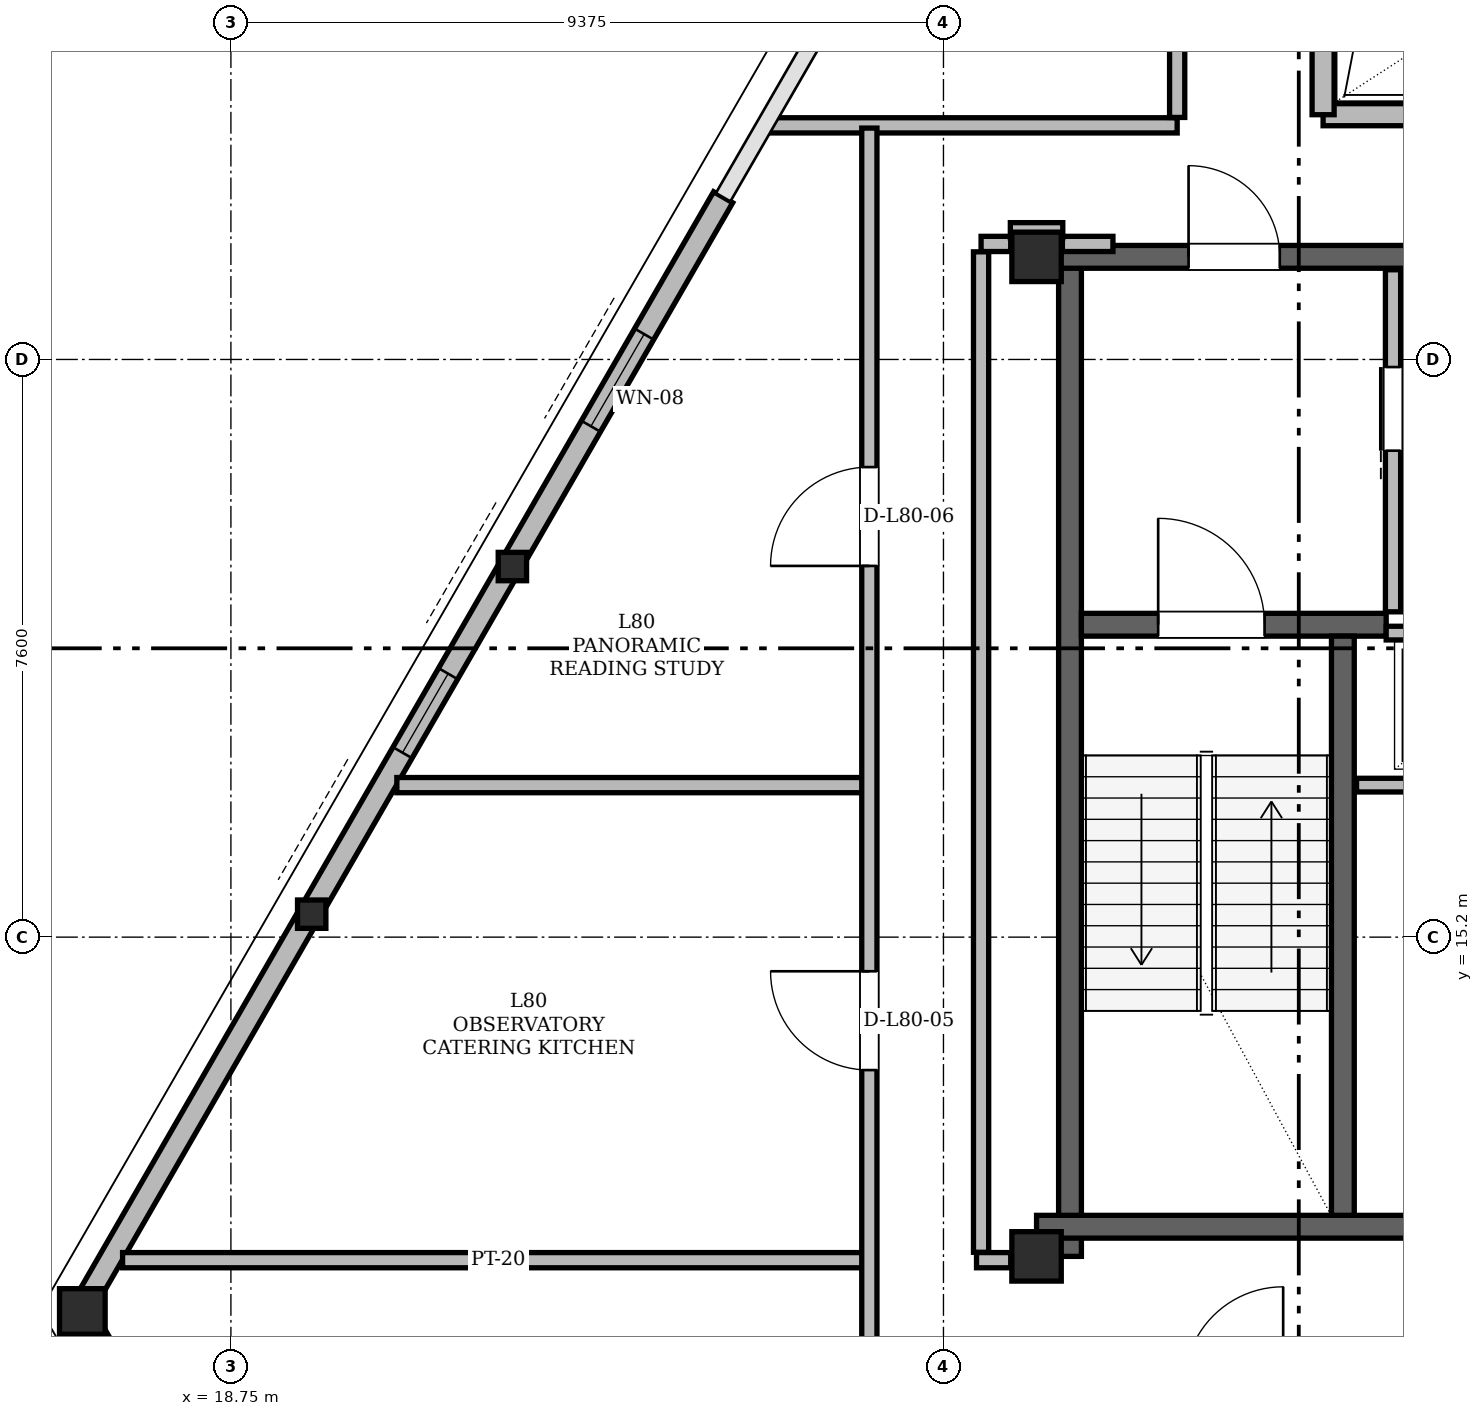
"""IFC4 building model, lengths in metres.
Left out: names, types, materials, properties, quantities, classifications, styles, units other than length and angle.
Written with IfcOpenShell. Run it as: python <this file> out.ifc"""

import sys

from ifc_helpers import new_model, si_unit, direction, frame, frame_2d, origin, origin_2d, place, context, subcontext, project, spatial, rectangle, hollow_rectangle, i_section, extrude, element, fill, save


model = new_model("IFC4")
c1 = context("Model", 3, precision=1e-05, world=origin(), true_north=direction((0.0, 1.0)))
c2 = subcontext(c1, "Body", "Model", "MODEL_VIEW")
j1 = project(units=[si_unit("LENGTHUNIT", "METRE"), si_unit("PLANEANGLEUNIT", "RADIAN")], contexts=[c1])
p1 = place(None, origin())
s1 = spatial("IfcSite", under=j1, at=p1, CompositionType="ELEMENT")
p2 = place(p1, origin())
s2 = spatial("IfcBuilding", under=s1, at=p2, CompositionType="ELEMENT")
p3 = place(p2, frame((0.0, 0.0, 305.1)))
s3 = spatial("IfcBuildingStorey", under=s2, at=p3, CompositionType="ELEMENT", Elevation=305.1)
for number, where, z_axis, x_axis in (
    (1, (29.35, 11.0, 0.0), (0.0, 0.0, 1.0), (1.0, 0.0, 0.0)),
    (2, (29.35, 24.15, 0.0), (0.0, 0.0, 1.0), (1.0, 0.0, 0.0)),
):
    element("IfcColumn", number, at=place(p3, frame(where, z_axis=z_axis, x_axis=x_axis)), inside=s3, PredefinedType="COLUMN", context=c2, shape_type="SweptSolid", body=[
        extrude(hollow_rectangle(XDim=0.65, YDim=0.65, WallThickness=0.05, at=origin_2d()), origin(), (0.0, 0.0, 1.0), 4.5),
    ])
p4 = place(p3, frame((16.776, 10.298, 0.004), z_axis=(0.008371104998, -0.010273628862, 0.99991218472), x_axis=(0.775234985517, 0.631672951162, 0.0)))
e3 = element("IfcColumn", 3, at=p4, inside=s3, PredefinedType="COLUMN", context=c2, shape_type="SweptSolid", body=[
    extrude(hollow_rectangle(XDim=0.6, YDim=0.6, WallThickness=0.045, at=origin_2d()), origin(), (0.0, 0.0, 1.0), 4.491),
])
p5 = place(p3, frame((22.431, 20.093, 0.004), z_axis=(0.009784499524, -0.007827599619, 0.999921493045), x_axis=(0.624695047554, 0.780868809443, 0.0)))
e4 = element("IfcColumn", 4, at=p5, inside=s3, PredefinedType="COLUMN", context=c2, shape_type="SweptSolid", body=[
    extrude(i_section(OverallWidth=0.373, OverallDepth=0.373, WebThickness=0.016, FlangeThickness=0.026, at=origin_2d()), origin(), (0.0, 0.0, 1.0), 4.491),
])
p6 = place(p3, frame((19.792, 15.522, 0.004), z_axis=(0.009132168349, -0.008969093914, 0.999918076072), x_axis=(0.700708014884, 0.713448160609, 0.0)))
e5 = element("IfcColumn", 5, at=p6, inside=s3, PredefinedType="COLUMN", context=c2, shape_type="SweptSolid", body=[
    extrude(i_section(OverallWidth=0.373, OverallDepth=0.373, WebThickness=0.016, FlangeThickness=0.026, at=origin_2d()), origin(), (0.0, 0.0, 1.0), 4.491),
])
p7 = place(p3, frame((29.79, 11.0, 0.0), z_axis=(0.0, 0.0, 1.0), x_axis=(0.0, 1.0, 0.0)))
e6 = element("IfcWall", 6, at=p7, inside=s3, PredefinedType="SHEAR", context=c2, shape_type="SweptSolid", body=[
    extrude(rectangle(XDim=13.3, YDim=0.3, at=frame_2d((6.65, 0.0))), origin(), (0.0, 0.0, 1.0), 4.28),
])
p8 = place(p3, frame((29.35, 11.39, 0.0), z_axis=(0.0, 0.0, 1.0), x_axis=(1.0, 0.0, 0.0)))
e7 = element("IfcWall", 7, at=p8, inside=s3, PredefinedType="SHEAR", context=c2, shape_type="SweptSolid", body=[
    extrude(rectangle(XDim=7.1, YDim=0.3, at=frame_2d((3.55, 0.0))), origin(), (0.0, 0.0, 1.0), 4.28),
])
p9 = place(p3, frame((29.65, 24.15, 0.0), z_axis=(0.0, 0.0, 1.0), x_axis=(1.0, 0.0, 0.0)))
e8 = element("IfcWall", 8, at=p9, inside=s3, PredefinedType="SHEAR", context=c2, shape_type="SweptSolid", body=[
    extrude(rectangle(XDim=15.7, YDim=0.3, at=frame_2d((7.85, 0.0))), origin(), (0.0, 0.0, 1.0), 4.28),
])
p10 = place(p9, frame((1.7, 0.0, 0.0)))
e9 = element("IfcOpeningElement", 9, at=p10, cuts=e8, PredefinedType="OPENING", context=c2, shape_type="SweptSolid", body=[
    extrude(rectangle(XDim=1.2, YDim=2.2, at=frame_2d((0.6, 1.1))), frame((0.0, 0.15, 0.0), z_axis=(0.0, -1.0, 0.0), x_axis=(1.0, 0.0, 0.0)), (0.0, 0.0, 1.0), 0.3),
])
p11 = place(p9, frame((12.8, 0.0, 0.0)))
e10 = element("IfcOpeningElement", 10, at=p11, cuts=e8, PredefinedType="OPENING", context=c2, shape_type="SweptSolid", body=[
    extrude(rectangle(XDim=1.2, YDim=2.2, at=frame_2d((0.6, 1.1))), frame((0.0, 0.15, 0.0), z_axis=(0.0, -1.0, 0.0), x_axis=(1.0, 0.0, 0.0)), (0.0, 0.0, 1.0), 0.3),
])
p12 = place(p9, frame((6.55, 0.0, 0.0)))
e11 = element("IfcOpeningElement", 11, at=p12, cuts=e8, PredefinedType="OPENING", context=c2, shape_type="SweptSolid", body=[
    extrude(rectangle(XDim=0.9, YDim=2.05, at=frame_2d((0.45, 1.025))), frame((0.0, 0.15, 0.0), z_axis=(0.0, -1.0, 0.0), x_axis=(1.0, 0.0, 0.0)), (0.0, 0.0, 1.0), 0.3),
])
p13 = place(p9, frame((8.45, 0.0, 0.0)))
e12 = element("IfcOpeningElement", 12, at=p13, cuts=e8, PredefinedType="OPENING", context=c2, shape_type="SweptSolid", body=[
    extrude(rectangle(XDim=0.9, YDim=2.05, at=frame_2d((0.45, 1.025))), frame((0.0, 0.15, 0.0), z_axis=(0.0, -1.0, 0.0), x_axis=(1.0, 0.0, 0.0)), (0.0, 0.0, 1.0), 0.3),
])
p14 = place(p3, frame((29.94, 19.31, 0.0), z_axis=(0.0, 0.0, 1.0), x_axis=(1.0, 0.0, 0.0)))
e13 = element("IfcWall", 13, at=p14, inside=s3, PredefinedType="SHEAR", context=c2, shape_type="SweptSolid", body=[
    extrude(rectangle(XDim=4.01, YDim=0.3, at=frame_2d((2.005, 0.0))), origin(), (0.0, 0.0, 1.0), 4.28),
])
p15 = place(p14, frame((1.01, 0.0, 0.0)))
e14 = element("IfcOpeningElement", 14, at=p15, cuts=e13, PredefinedType="OPENING", context=c2, shape_type="SweptSolid", body=[
    extrude(rectangle(XDim=1.4, YDim=2.2, at=frame_2d((0.7, 1.1))), frame((0.0, 0.15, 0.0), z_axis=(0.0, -1.0, 0.0), x_axis=(1.0, 0.0, 0.0)), (0.0, 0.0, 1.0), 0.3),
])
p16 = place(p3, frame((33.38, 11.54, 0.0), z_axis=(0.0, 0.0, 1.0), x_axis=(0.0, 1.0, 0.0)))
e15 = element("IfcWall", 15, at=p16, inside=s3, PredefinedType="SHEAR", context=c2, shape_type="SweptSolid", body=[
    extrude(rectangle(XDim=7.62, YDim=0.3, at=frame_2d((3.81, 0.0))), origin(), (0.0, 0.0, 1.0), 4.28),
])
p17 = place(p3, frame((16.776, 10.298, 0.0), z_axis=(0.0, 0.0, 1.0), x_axis=(0.500000729302, -0.866024982721, 0.0)))
e16 = element("IfcWall", 16, at=p17, inside=s3, PredefinedType="SOLIDWALL", context=c2, shape_type="SweptSolid", body=[
    extrude(rectangle(XDim=3.747, YDim=0.29, at=frame_2d((1.873, 0.0))), origin(), (0.0, 0.0, 1.0), 3.658),
])
p18 = place(p3, frame((25.227, 24.934, 0.0), z_axis=(0.0, 0.0, 1.0), x_axis=(-0.500004644874, -0.866022722049, 0.0)))
e17 = element("IfcWall", 17, at=p18, inside=s3, PredefinedType="SOLIDWALL", context=c2, shape_type="SweptSolid", body=[
    extrude(rectangle(XDim=16.9, YDim=0.29, at=frame_2d((8.45, 0.0))), origin(), (0.0, 0.0, 1.0), 3.658),
])
p19 = place(p18, frame((2.079, 0.0, 0.85)))
e18 = element("IfcOpeningElement", 18, at=p19, cuts=e17, PredefinedType="OPENING", context=c2, shape_type="SweptSolid", body=[
    extrude(rectangle(XDim=1.4, YDim=1.6, at=frame_2d((0.7, 0.8))), frame((0.0, 0.145, 0.0), z_axis=(0.0, -1.0, 0.0), x_axis=(1.0, 0.0, 0.0)), (0.0, 0.0, 1.0), 0.29),
])
p20 = place(p18, frame((7.238, 0.0, 0.85)))
e19 = element("IfcOpeningElement", 19, at=p20, cuts=e17, PredefinedType="OPENING", context=c2, shape_type="SweptSolid", body=[
    extrude(rectangle(XDim=1.2, YDim=1.48, at=frame_2d((0.6, 0.74))), frame((0.0, 0.145, 0.0), z_axis=(0.0, -1.0, 0.0), x_axis=(1.0, 0.0, 0.0)), (0.0, 0.0, 1.0), 0.29),
])
p21 = place(p3, frame((33.12, 26.02, 0.0), z_axis=(0.0, 0.0, 1.0), x_axis=(1.0, 0.0, 0.0)))
e20 = element("IfcWall", 20, at=p21, inside=s3, PredefinedType="SOLIDWALL", context=c2, shape_type="SweptSolid", body=[
    extrude(rectangle(XDim=10.56, YDim=0.29, at=frame_2d((5.28, 0.0))), origin(), (0.0, 0.0, 1.0), 4.28),
])
p22 = place(p21, frame((1.68, 0.0, 0.0)))
e21 = element("IfcOpeningElement", 21, at=p22, cuts=e20, PredefinedType="OPENING", context=c2, shape_type="SweptSolid", body=[
    extrude(rectangle(XDim=1.6, YDim=2.2, at=frame_2d((0.8, 1.1))), frame((0.0, 0.145, 0.0), z_axis=(0.0, -1.0, 0.0), x_axis=(1.0, 0.0, 0.0)), (0.0, 0.0, 1.0), 0.29),
])
p23 = place(p21, frame((7.28, 0.0, 0.0)))
e22 = element("IfcOpeningElement", 22, at=p23, cuts=e20, PredefinedType="OPENING", context=c2, shape_type="SweptSolid", body=[
    extrude(rectangle(XDim=1.6, YDim=2.2, at=frame_2d((0.8, 1.1))), frame((0.0, 0.145, 0.0), z_axis=(0.0, -1.0, 0.0), x_axis=(1.0, 0.0, 0.0)), (0.0, 0.0, 1.0), 0.29),
])
p24 = place(p3, frame((33.12, 26.02, 0.0), z_axis=(0.0, 0.0, 1.0), x_axis=(0.0, 1.0, 0.0)))
e23 = element("IfcWall", 23, at=p24, inside=s3, PredefinedType="SOLIDWALL", context=c2, shape_type="SweptSolid", body=[
    extrude(rectangle(XDim=6.96, YDim=0.29, at=frame_2d((3.48, 0.0))), origin(), (0.0, 0.0, 1.0), 4.28),
])
p25 = place(p3, frame((34.04, 19.48, 0.0), z_axis=(0.0, 0.0, 1.0), x_axis=(0.0, 1.0, 0.0)))
e24 = element("IfcWall", 24, at=p25, inside=s3, PredefinedType="PARTITIONING", context=c2, shape_type="SweptSolid", body=[
    extrude(rectangle(XDim=4.5, YDim=0.2, at=frame_2d((2.25, 0.0))), origin(), (0.0, 0.0, 1.0), 4.28),
])
p26 = place(p25, frame((2.12, 0.0, 0.0)))
e25 = element("IfcOpeningElement", 25, at=p26, cuts=e24, PredefinedType="OPENING", context=c2, shape_type="SweptSolid", body=[
    extrude(rectangle(XDim=1.1, YDim=2.2, at=frame_2d((0.55, 1.1))), frame((0.0, 0.1, 0.0), z_axis=(0.0, -1.0, 0.0), x_axis=(1.0, 0.0, 0.0)), (0.0, 0.0, 1.0), 0.2),
])
p27 = place(p3, frame((34.16, 20.86, 0.0), z_axis=(0.0, 0.0, 1.0), x_axis=(1.0, 0.0, 0.0)))
e26 = element("IfcWall", 26, at=p27, inside=s3, PredefinedType="PARTITIONING", context=c2, shape_type="SweptSolid", body=[
    extrude(rectangle(XDim=1.58, YDim=0.18, at=frame_2d((0.79, 0.0))), origin(), (0.0, 0.0, 1.0), 4.28),
])
p28 = place(p3, frame((33.95, 19.2, 0.0), z_axis=(0.0, 0.0, 1.0), x_axis=(1.0, 0.0, 0.0)))
e27 = element("IfcWall", 27, at=p28, inside=s3, PredefinedType="PARTITIONING", context=c2, shape_type="SweptSolid", body=[
    extrude(rectangle(XDim=2.27, YDim=0.18, at=frame_2d((1.135, 0.0))), origin(), (0.0, 0.0, 1.0), 4.28),
])
p29 = place(p3, frame((33.56, 17.2, 0.0), z_axis=(0.0, 0.0, 1.0), x_axis=(1.0, 0.0, 0.0)))
e28 = element("IfcWall", 28, at=p29, inside=s3, PredefinedType="PARTITIONING", context=c2, shape_type="SweptSolid", body=[
    extrude(rectangle(XDim=2.66, YDim=0.18, at=frame_2d((1.33, 0.0))), origin(), (0.0, 0.0, 1.0), 4.28),
])
p30 = place(p3, frame((17.325, 10.95, 0.0), z_axis=(0.0, 0.0, 1.0), x_axis=(1.0, 0.0, 0.0)))
e29 = element("IfcWall", 29, at=p30, inside=s3, PredefinedType="PARTITIONING", context=c2, shape_type="SweptSolid", body=[
    extrude(rectangle(XDim=9.885, YDim=0.2, at=frame_2d((4.943, 0.0))), origin(), (0.0, 0.0, 1.0), 3.866),
])
p31 = place(p3, frame((28.56, 10.95, 0.0), z_axis=(0.0, 0.0, 1.0), x_axis=(1.0, 0.0, 0.0)))
e30 = element("IfcWall", 30, at=p31, inside=s3, PredefinedType="PARTITIONING", context=c2, shape_type="SweptSolid", body=[
    extrude(rectangle(XDim=0.45, YDim=0.2, at=frame_2d((0.225, 0.0))), origin(), (0.0, 0.0, 1.0), 3.866),
])
p32 = place(p3, frame((20.933, 17.2, 0.0), z_axis=(0.0, 0.0, 1.0), x_axis=(1.0, 0.0, 0.0)))
e31 = element("IfcWall", 31, at=p32, inside=s3, PredefinedType="PARTITIONING", context=c2, shape_type="SweptSolid", body=[
    extrude(rectangle(XDim=6.217, YDim=0.2, at=frame_2d((3.108, 0.0))), origin(), (0.0, 0.0, 1.0), 4.28),
])
p33 = place(p3, frame((28.62, 24.32, 0.0), z_axis=(0.0, 0.0, 1.0), x_axis=(1.0, 0.0, 0.0)))
e32 = element("IfcWall", 32, at=p33, inside=s3, PredefinedType="PARTITIONING", context=c2, shape_type="SweptSolid", body=[
    extrude(rectangle(XDim=0.39, YDim=0.2, at=frame_2d((0.195, 0.0))), origin(), (0.0, 0.0, 1.0), 4.28),
])
p34 = place(p3, frame((29.69, 24.32, 0.0), z_axis=(0.0, 0.0, 1.0), x_axis=(1.0, 0.0, 0.0)))
e33 = element("IfcWall", 33, at=p34, inside=s3, PredefinedType="PARTITIONING", context=c2, shape_type="SweptSolid", body=[
    extrude(rectangle(XDim=0.665, YDim=0.2, at=frame_2d((0.333, 0.0))), origin(), (0.0, 0.0, 1.0), 3.42),
])
p35 = place(p3, frame((29.005, 24.5, 0.0), z_axis=(0.0, 0.0, 1.0), x_axis=(1.0, 0.0, 0.0)))
e34 = element("IfcWall", 34, at=p35, inside=s3, PredefinedType="PARTITIONING", context=c2, shape_type="SweptSolid", body=[
    extrude(rectangle(XDim=0.69, YDim=0.2, at=frame_2d((0.345, 0.0))), origin(), (0.0, 0.0, 1.0), 4.28),
])
p36 = place(p3, frame((25.836, 25.88, 0.0), z_axis=(0.0, 0.0, 1.0), x_axis=(1.0, 0.0, 0.0)))
e35 = element("IfcWall", 35, at=p36, inside=s3, PredefinedType="PARTITIONING", context=c2, shape_type="SweptSolid", body=[
    extrude(rectangle(XDim=5.364, YDim=0.2, at=frame_2d((2.682, 0.0))), origin(), (0.0, 0.0, 1.0), 3.658),
])
p37 = place(p3, frame((27.15, 9.404, 0.0), z_axis=(0.0, 0.0, 1.0), x_axis=(0.0, 1.0, 0.0)))
e36 = element("IfcWall", 36, at=p37, inside=s3, PredefinedType="PARTITIONING", context=c2, shape_type="SweptSolid", body=[
    extrude(rectangle(XDim=16.44, YDim=0.2, at=frame_2d((8.22, 0.0))), origin(), (0.0, 0.0, 1.0), 3.866),
])
p38 = place(p37, frame((4.047, 0.0, 0.0)))
e37 = element("IfcOpeningElement", 37, at=p38, cuts=e36, PredefinedType="OPENING", context=c2, shape_type="SweptSolid", body=[
    extrude(rectangle(XDim=1.3, YDim=2.2, at=frame_2d((0.65, 1.1))), frame((0.0, 0.1, 0.0), z_axis=(0.0, -1.0, 0.0), x_axis=(1.0, 0.0, 0.0)), (0.0, 0.0, 1.0), 0.2),
])
p39 = place(p37, frame((10.68, 0.0, 0.0)))
e38 = element("IfcOpeningElement", 38, at=p39, cuts=e36, PredefinedType="OPENING", context=c2, shape_type="SweptSolid", body=[
    extrude(rectangle(XDim=1.3, YDim=2.2, at=frame_2d((0.65, 1.1))), frame((0.0, 0.1, 0.0), z_axis=(0.0, -1.0, 0.0), x_axis=(1.0, 0.0, 0.0)), (0.0, 0.0, 1.0), 0.2),
])
p40 = place(p3, frame((28.62, 11.054, 0.0), z_axis=(0.0, 0.0, 1.0), x_axis=(0.0, 1.0, 0.0)))
e39 = element("IfcWall", 39, at=p40, inside=s3, PredefinedType="PARTITIONING", context=c2, shape_type="SweptSolid", body=[
    extrude(rectangle(XDim=13.162, YDim=0.2, at=frame_2d((6.581, 0.0))), origin(), (0.0, 0.0, 1.0), 4.28),
])
p41 = place(p3, frame((31.2, 25.984, 0.0), z_axis=(0.0, 0.0, 1.0), x_axis=(0.0, 1.0, 0.0)))
e40 = element("IfcWall", 40, at=p41, inside=s3, PredefinedType="PARTITIONING", context=c2, shape_type="SweptSolid", body=[
    extrude(rectangle(XDim=8.712, YDim=0.2, at=frame_2d((4.356, 0.0))), origin(), (0.0, 0.0, 1.0), 4.28),
])
p42 = place(p41, frame((3.731, 0.0, 0.0)))
e41 = element("IfcOpeningElement", 41, at=p42, cuts=e40, PredefinedType="OPENING", context=c2, shape_type="SweptSolid", body=[
    extrude(rectangle(XDim=1.3, YDim=2.2, at=frame_2d((0.65, 1.1))), frame((0.0, 0.1, 0.0), z_axis=(0.0, -1.0, 0.0), x_axis=(1.0, 0.0, 0.0)), (0.0, 0.0, 1.0), 0.2),
])
p43 = place(p19, origin())
e42 = element("IfcWindow", 42, at=p43, inside=s3, PartitioningType="SINGLE_PANEL", PredefinedType="WINDOW", context=c2, shape_type="SweptSolid", body=[
    extrude(rectangle(XDim=1.4, YDim=1.6, at=frame_2d((0.7, 0.8))), frame((0.0, 0.03, 0.0), z_axis=(0.0, -1.0, 0.0), x_axis=(1.0, 0.0, 0.0)), (0.0, 0.0, 1.0), 0.06),
])
fill(e18, e42)
p44 = place(p20, origin())
e43 = element("IfcWindow", 43, at=p44, inside=s3, PartitioningType="SINGLE_PANEL", PredefinedType="WINDOW", context=c2, shape_type="SweptSolid", body=[
    extrude(rectangle(XDim=1.2, YDim=1.48, at=frame_2d((0.6, 0.74))), frame((0.0, 0.03, 0.0), z_axis=(0.0, -1.0, 0.0), x_axis=(1.0, 0.0, 0.0)), (0.0, 0.0, 1.0), 0.06),
])
fill(e19, e43)
p45 = place(p26, origin())
e44 = element("IfcDoor", 44, at=p45, inside=s3, OperationType="SLIDING_TO_LEFT", PredefinedType="DOOR", context=c2, shape_type="SweptSolid", body=[
    extrude(rectangle(XDim=1.1, YDim=2.2, at=frame_2d((0.55, 1.1))), frame((0.0, 0.025, 0.0), z_axis=(0.0, -1.0, 0.0), x_axis=(1.0, 0.0, 0.0)), (0.0, 0.0, 1.0), 0.05),
])
fill(e25, e44)
p46 = place(p15, origin())
e45 = element("IfcDoor", 45, at=p46, inside=s3, OperationType="SINGLE_SWING_LEFT", PredefinedType="DOOR", context=c2, shape_type="SweptSolid", body=[
    extrude(rectangle(XDim=1.4, YDim=2.2, at=frame_2d((0.7, 1.1))), frame((0.0, 0.025, 0.0), z_axis=(0.0, -1.0, 0.0), x_axis=(1.0, 0.0, 0.0)), (0.0, 0.0, 1.0), 0.05),
])
fill(e14, e45)
p47 = place(p10, origin())
e46 = element("IfcDoor", 46, at=p47, inside=s3, OperationType="SINGLE_SWING_LEFT", PredefinedType="DOOR", context=c2, shape_type="SweptSolid", body=[
    extrude(rectangle(XDim=1.2, YDim=2.2, at=frame_2d((0.6, 1.1))), frame((0.0, 0.025, 0.0), z_axis=(0.0, -1.0, 0.0), x_axis=(1.0, 0.0, 0.0)), (0.0, 0.0, 1.0), 0.05),
])
fill(e9, e46)
p48 = place(p38, origin())
e47 = element("IfcDoor", 47, at=p48, inside=s3, OperationType="SINGLE_SWING_RIGHT", PredefinedType="DOOR", context=c2, shape_type="SweptSolid", body=[
    extrude(rectangle(XDim=1.3, YDim=2.2, at=frame_2d((0.65, 1.1))), frame((0.0, 0.025, 0.0), z_axis=(0.0, -1.0, 0.0), x_axis=(1.0, 0.0, 0.0)), (0.0, 0.0, 1.0), 0.05),
])
fill(e37, e47)
p49 = place(p39, origin())
e48 = element("IfcDoor", 48, at=p49, inside=s3, OperationType="SINGLE_SWING_LEFT", PredefinedType="DOOR", context=c2, shape_type="SweptSolid", body=[
    extrude(rectangle(XDim=1.3, YDim=2.2, at=frame_2d((0.65, 1.1))), frame((0.0, 0.025, 0.0), z_axis=(0.0, -1.0, 0.0), x_axis=(1.0, 0.0, 0.0)), (0.0, 0.0, 1.0), 0.05),
])
fill(e38, e48)
save(model, sys.argv[1])
